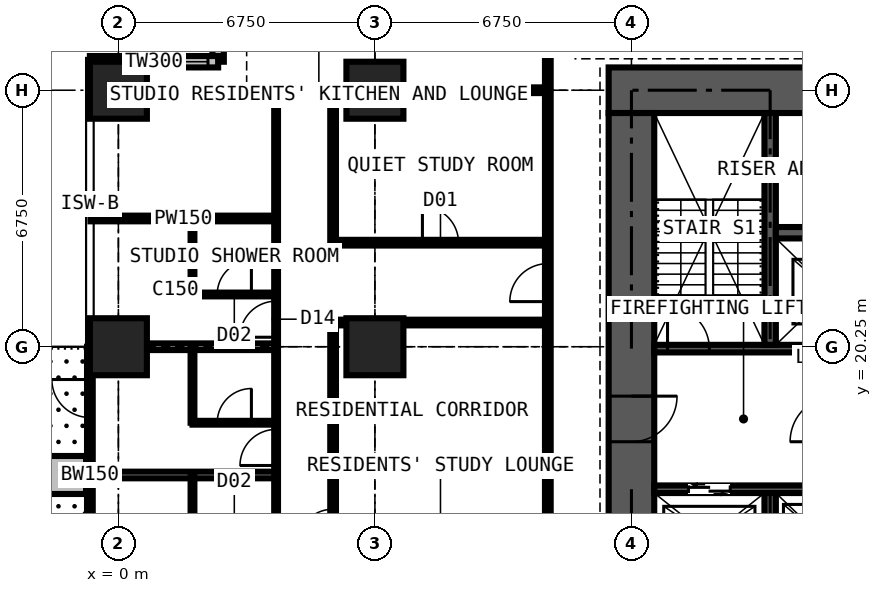
"""IFC4 building model, lengths in metres.
Left out: names, types, materials, properties, quantities, classifications, styles, units other than length and angle.
Written with IfcOpenShell. Run it as: python <this file> out.ifc"""

import sys

from ifc_helpers import new_model, si_unit, direction, frame, frame_2d, origin, origin_2d, place, context, subcontext, project, spatial, rectangle, extrude, element, fill, save


model = new_model("IFC4")
c1 = context("Model", 3, precision=1e-05, world=origin(), true_north=direction((0.0, 1.0)))
c2 = subcontext(c1, "Body", "Model", "MODEL_VIEW")
j1 = project(units=[si_unit("LENGTHUNIT", "METRE"), si_unit("PLANEANGLEUNIT", "RADIAN")], contexts=[c1])
p1 = place(None, origin())
s1 = spatial("IfcSite", under=j1, at=p1, CompositionType="ELEMENT")
p2 = place(p1, origin())
s2 = spatial("IfcBuilding", under=s1, at=p2, CompositionType="ELEMENT")
p3 = place(p2, frame((0.0, 0.0, 130.5)))
s3 = spatial("IfcBuildingStorey", under=s2, at=p3, CompositionType="ELEMENT", Elevation=130.5)
for number, where, z_axis, x_axis in (
    (1, (0.0, 20.25, 0.0), (0.0, 0.0, 1.0), (1.0, 0.0, 0.0)),
    (2, (0.0, 27.0, 0.0), (0.0, 0.0, 1.0), (1.0, 0.0, 0.0)),
    (3, (6.75, 20.25, 0.0), (0.0, 0.0, 1.0), (1.0, 0.0, 0.0)),
    (4, (6.75, 27.0, 0.0), (0.0, 0.0, 1.0), (1.0, 0.0, 0.0)),
):
    element("IfcColumn", number, at=place(p3, frame(where, z_axis=z_axis, x_axis=x_axis)), inside=s3, PredefinedType="COLUMN", context=c2, shape_type="SweptSolid", body=[
        extrude(rectangle(XDim=1.5, YDim=1.5, at=origin_2d()), origin(), (0.0, 0.0, 1.0), 3.6),
    ])
p4 = place(p3, frame((27.6, 27.0, 0.0), z_axis=(0.0, 0.0, 1.0), x_axis=(-1.0, 0.0, 0.0)))
e5 = element("IfcWall", 5, at=p4, inside=s3, PredefinedType="SHEAR", context=c2, shape_type="SweptSolid", body=[
    extrude(rectangle(XDim=14.7, YDim=1.2, at=frame_2d((7.35, 0.0))), origin(), (0.0, 0.0, 1.0), 3.6),
])
p5 = place(p4, frame((4.55, 0.0, 0.0)))
e6 = element("IfcOpeningElement", 6, at=p5, cuts=e5, PredefinedType="OPENING", context=c2, shape_type="SweptSolid", body=[
    extrude(rectangle(XDim=0.9, YDim=2.2, at=frame_2d((0.45, 1.1))), frame((0.0, 0.61, 0.0), z_axis=(0.0, -1.0, 0.0), x_axis=(1.0, 0.0, 0.0)), (0.0, 0.0, 1.0), 1.22),
])
p6 = place(p4, frame((7.525, 0.0, 0.0)))
e7 = element("IfcOpeningElement", 7, at=p6, cuts=e5, PredefinedType="OPENING", context=c2, shape_type="SweptSolid", body=[
    extrude(rectangle(XDim=1.0, YDim=2.2, at=frame_2d((0.5, 1.1))), frame((0.0, 0.61, 0.0), z_axis=(0.0, -1.0, 0.0), x_axis=(1.0, 0.0, 0.0)), (0.0, 0.0, 1.0), 1.22),
])
p7 = place(p3, frame((13.5, 26.4, 0.0), z_axis=(0.0, 0.0, 1.0), x_axis=(0.0, -1.0, 0.0)))
e8 = element("IfcWall", 8, at=p7, inside=s3, PredefinedType="SHEAR", context=c2, shape_type="SweptSolid", body=[
    extrude(rectangle(XDim=12.3, YDim=1.2, at=frame_2d((6.15, 0.0))), origin(), (0.0, 0.0, 1.0), 3.6),
])
p8 = place(p7, frame((7.45, 0.0, 0.0)))
e9 = element("IfcOpeningElement", 9, at=p8, cuts=e8, PredefinedType="OPENING", context=c2, shape_type="SweptSolid", body=[
    extrude(rectangle(XDim=1.2, YDim=2.2, at=frame_2d((0.6, 1.1))), frame((0.0, 0.61, 0.0), z_axis=(0.0, -1.0, 0.0), x_axis=(1.0, 0.0, 0.0)), (0.0, 0.0, 1.0), 1.22),
])
p9 = place(p3, frame((2.625, 31.125, 0.0), z_axis=(0.0, 0.0, 1.0), x_axis=(0.0, -1.0, 0.0)))
e10 = element("IfcWall", 10, at=p9, inside=s3, PredefinedType="SOLIDWALL", context=c2, shape_type="SweptSolid", body=[
    extrude(rectangle(XDim=3.375, YDim=0.3, at=frame_2d((1.688, 0.0))), origin(), (0.0, 0.0, 1.0), 3.375),
])
p10 = place(p9, frame((0.788, 0.0, 0.6)))
e11 = element("IfcOpeningElement", 11, at=p10, cuts=e10, PredefinedType="OPENING", context=c2, shape_type="SweptSolid", body=[
    extrude(rectangle(XDim=1.8, YDim=2.1, at=frame_2d((0.9, 1.05))), frame((0.0, 0.16, 0.0), z_axis=(0.0, -1.0, 0.0), x_axis=(1.0, 0.0, 0.0)), (0.0, 0.0, 1.0), 0.32),
])
p11 = place(p3, frame((2.625, 27.75, 0.0), z_axis=(0.0, 0.0, 1.0), x_axis=(-1.0, 0.0, 0.0)))
e12 = element("IfcWall", 12, at=p11, inside=s3, PredefinedType="SOLIDWALL", context=c2, shape_type="SweptSolid", body=[
    extrude(rectangle(XDim=3.375, YDim=0.3, at=frame_2d((1.688, 0.0))), origin(), (0.0, 0.0, 1.0), 3.375),
])
p12 = place(p11, frame((0.268, 0.0, 0.9)))
e13 = element("IfcOpeningElement", 13, at=p12, cuts=e12, PredefinedType="OPENING", context=c2, shape_type="SweptSolid", body=[
    extrude(rectangle(XDim=1.5, YDim=1.8, at=frame_2d((0.75, 0.9))), frame((0.0, 0.16, 0.0), z_axis=(0.0, -1.0, 0.0), x_axis=(1.0, 0.0, 0.0)), (0.0, 0.0, 1.0), 0.32),
])
p13 = place(p3, frame((-0.75, 13.5, 0.0), z_axis=(0.0, 0.0, 1.0), x_axis=(0.0, 1.0, 0.0)))
e14 = element("IfcWall", 14, at=p13, inside=s3, PredefinedType="SOLIDWALL", context=c2, shape_type="SweptSolid", body=[
    extrude(rectangle(XDim=6.75, YDim=0.15, at=frame_2d((3.375, 0.0))), origin(), (0.0, 0.0, 1.0), 3.375),
])
p14 = place(p13, frame((0.863, 0.0, 0.0)))
e15 = element("IfcOpeningElement", 15, at=p14, cuts=e14, PredefinedType="OPENING", context=c2, shape_type="SweptSolid", body=[
    extrude(rectangle(XDim=1.0, YDim=2.2, at=frame_2d((0.5, 1.1))), frame((0.0, 0.085, 0.0), z_axis=(0.0, -1.0, 0.0), x_axis=(1.0, 0.0, 0.0)), (0.0, 0.0, 1.0), 0.17),
])
p15 = place(p13, frame((1.975, 0.0, 0.9)))
e16 = element("IfcOpeningElement", 16, at=p15, cuts=e14, PredefinedType="OPENING", context=c2, shape_type="SweptSolid", body=[
    extrude(rectangle(XDim=1.2, YDim=1.8, at=frame_2d((0.6, 0.9))), frame((0.0, 0.085, 0.0), z_axis=(0.0, -1.0, 0.0), x_axis=(1.0, 0.0, 0.0)), (0.0, 0.0, 1.0), 0.17),
])
p16 = place(p13, frame((4.887, 0.0, 0.0)))
e17 = element("IfcOpeningElement", 17, at=p16, cuts=e14, PredefinedType="OPENING", context=c2, shape_type="SweptSolid", body=[
    extrude(rectangle(XDim=1.0, YDim=2.2, at=frame_2d((0.5, 1.1))), frame((0.0, 0.085, 0.0), z_axis=(0.0, -1.0, 0.0), x_axis=(1.0, 0.0, 0.0)), (0.0, 0.0, 1.0), 0.17),
])
p17 = place(p13, frame((3.575, 0.0, 0.9)))
e18 = element("IfcOpeningElement", 18, at=p17, cuts=e14, PredefinedType="OPENING", context=c2, shape_type="SweptSolid", body=[
    extrude(rectangle(XDim=1.2, YDim=1.8, at=frame_2d((0.6, 0.9))), frame((0.0, 0.085, 0.0), z_axis=(0.0, -1.0, 0.0), x_axis=(1.0, 0.0, 0.0)), (0.0, 0.0, 1.0), 0.17),
])
p18 = place(p3, frame((-0.85, 16.875, 0.0), z_axis=(0.0, 0.0, 1.0), x_axis=(-1.0, 0.0, 0.0)))
e19 = element("IfcWall", 19, at=p18, inside=s3, PredefinedType="USERDEFINED", context=c2, shape_type="SweptSolid", body=[
    extrude(rectangle(XDim=2.2, YDim=1.0, at=frame_2d((1.1, 0.0))), origin(), (0.0, 0.0, 1.0), 0.9),
])
p19 = place(p3, frame((14.1, 16.5, 0.0), z_axis=(0.0, 0.0, 1.0), x_axis=(1.0, 0.0, 0.0)))
e20 = element("IfcWall", 20, at=p19, inside=s3, PredefinedType="SHEAR", context=c2, shape_type="SweptSolid", body=[
    extrude(rectangle(XDim=12.3, YDim=0.2, at=frame_2d((6.15, 0.0))), origin(), (0.0, 0.0, 1.0), 3.6),
])
p20 = place(p19, frame((0.9, 0.0, 0.0)))
e21 = element("IfcOpeningElement", 21, at=p20, cuts=e20, PredefinedType="OPENING", context=c2, shape_type="SweptSolid", body=[
    extrude(rectangle(XDim=1.1, YDim=2.2, at=frame_2d((0.55, 1.1))), frame((0.0, 0.11, 0.0), z_axis=(0.0, -1.0, 0.0), x_axis=(1.0, 0.0, 0.0)), (0.0, 0.0, 1.0), 0.22),
])
p21 = place(p19, frame((9.5, 0.0, 0.0)))
e22 = element("IfcOpeningElement", 22, at=p21, cuts=e20, PredefinedType="OPENING", context=c2, shape_type="SweptSolid", body=[
    extrude(rectangle(XDim=1.1, YDim=2.2, at=frame_2d((0.55, 1.1))), frame((0.0, 0.11, 0.0), z_axis=(0.0, -1.0, 0.0), x_axis=(1.0, 0.0, 0.0)), (0.0, 0.0, 1.0), 0.22),
])
p22 = place(p3, frame((14.1, 20.2, 0.0), z_axis=(0.0, 0.0, 1.0), x_axis=(1.0, 0.0, 0.0)))
e23 = element("IfcWall", 23, at=p22, inside=s3, PredefinedType="SHEAR", context=c2, shape_type="SweptSolid", body=[
    extrude(rectangle(XDim=12.3, YDim=0.2, at=frame_2d((6.15, 0.0))), origin(), (0.0, 0.0, 1.0), 3.6),
])
p23 = place(p22, frame((0.35, 0.0, 0.0)))
e24 = element("IfcOpeningElement", 24, at=p23, cuts=e23, PredefinedType="OPENING", context=c2, shape_type="SweptSolid", body=[
    extrude(rectangle(XDim=1.1, YDim=2.2, at=frame_2d((0.55, 1.1))), frame((0.0, 0.11, 0.0), z_axis=(0.0, -1.0, 0.0), x_axis=(1.0, 0.0, 0.0)), (0.0, 0.0, 1.0), 0.22),
])
p24 = place(p22, frame((9.75, 0.0, 0.0)))
e25 = element("IfcOpeningElement", 25, at=p24, cuts=e23, PredefinedType="OPENING", context=c2, shape_type="SweptSolid", body=[
    extrude(rectangle(XDim=1.1, YDim=2.2, at=frame_2d((0.55, 1.1))), frame((0.0, 0.11, 0.0), z_axis=(0.0, -1.0, 0.0), x_axis=(1.0, 0.0, 0.0)), (0.0, 0.0, 1.0), 0.22),
])
p25 = place(p3, frame((17.15, 20.3, 0.0), z_axis=(0.0, 0.0, 1.0), x_axis=(0.0, 1.0, 0.0)))
e26 = element("IfcWall", 26, at=p25, inside=s3, PredefinedType="SHEAR", context=c2, shape_type="SweptSolid", body=[
    extrude(rectangle(XDim=6.1, YDim=0.3, at=frame_2d((3.05, 0.0))), origin(), (0.0, 0.0, 1.0), 3.6),
])
p26 = place(p3, frame((17.3, 23.25, 0.0), z_axis=(0.0, 0.0, 1.0), x_axis=(1.0, 0.0, 0.0)))
e27 = element("IfcWall", 27, at=p26, inside=s3, PredefinedType="SHEAR", context=c2, shape_type="SweptSolid", body=[
    extrude(rectangle(XDim=5.9, YDim=0.3, at=frame_2d((2.95, 0.0))), origin(), (0.0, 0.0, 1.0), 3.6),
])
p27 = place(p3, frame((17.15, 14.1, 0.0), z_axis=(0.0, 0.0, 1.0), x_axis=(0.0, 1.0, 0.0)))
e28 = element("IfcWall", 28, at=p27, inside=s3, PredefinedType="SHEAR", context=c2, shape_type="SweptSolid", body=[
    extrude(rectangle(XDim=2.3, YDim=0.3, at=frame_2d((1.15, 0.0))), origin(), (0.0, 0.0, 1.0), 3.6),
])
p28 = place(p3, frame((-0.734, 16.875, 0.0), z_axis=(0.0, 0.0, 1.0), x_axis=(1.0, 0.0, 0.0)))
e29 = element("IfcWall", 29, at=p28, inside=s3, PredefinedType="PARTITIONING", context=c2, shape_type="SweptSolid", body=[
    extrude(rectangle(XDim=4.884, YDim=0.175, at=frame_2d((2.442, 0.0))), origin(), (0.0, 0.0, 1.0), 3.375),
])
p29 = place(p3, frame((-0.734, 20.25, 0.0), z_axis=(0.0, 0.0, 1.0), x_axis=(1.0, 0.0, 0.0)))
e30 = element("IfcWall", 30, at=p29, inside=s3, PredefinedType="PARTITIONING", context=c2, shape_type="SweptSolid", body=[
    extrude(rectangle(XDim=4.884, YDim=0.175, at=frame_2d((2.442, 0.0))), origin(), (0.0, 0.0, 1.0), 2.877),
])
p30 = place(p3, frame((-0.734, 23.625, 0.0), z_axis=(0.0, 0.0, 1.0), x_axis=(1.0, 0.0, 0.0)))
e31 = element("IfcWall", 31, at=p30, inside=s3, PredefinedType="PARTITIONING", context=c2, shape_type="SweptSolid", body=[
    extrude(rectangle(XDim=4.884, YDim=0.15, at=frame_2d((2.442, 0.0))), origin(), (0.0, 0.0, 1.0), 3.375),
])
for number, where, z_axis, x_axis in (
    (32, (1.95, 14.875, 0.0), (0.0, 0.0, 1.0), (0.0, 1.0, 0.0)),
    (33, (1.95, 18.25, 0.0), (0.0, 0.0, 1.0), (0.0, 1.0, 0.0)),
):
    element("IfcWall", number, at=place(p3, frame(where, z_axis=z_axis, x_axis=x_axis)), inside=s3, PredefinedType="PARTITIONING", context=c2, shape_type="SweptSolid", body=[
        extrude(rectangle(XDim=2.0, YDim=0.1, at=frame_2d((1.0, 0.0))), origin(), (0.0, 0.0, 1.0), 3.375),
    ])
p31 = place(p3, frame((1.95, 18.25, 0.0), z_axis=(0.0, 0.0, 1.0), x_axis=(1.0, 0.0, 0.0)))
e34 = element("IfcWall", 34, at=p31, inside=s3, PredefinedType="PARTITIONING", context=c2, shape_type="SweptSolid", body=[
    extrude(rectangle(XDim=2.2, YDim=0.1, at=frame_2d((1.1, 0.0))), origin(), (0.0, 0.0, 1.0), 3.375),
])
p32 = place(p31, frame((0.65, 0.0, 0.0)))
e35 = element("IfcOpeningElement", 35, at=p32, cuts=e34, PredefinedType="OPENING", context=c2, shape_type="SweptSolid", body=[
    extrude(rectangle(XDim=0.9, YDim=2.2, at=frame_2d((0.45, 1.1))), frame((0.0, 0.06, 0.0), z_axis=(0.0, -1.0, 0.0), x_axis=(1.0, 0.0, 0.0)), (0.0, 0.0, 1.0), 0.12),
])
p33 = place(p3, frame((1.95, 21.625, 0.0), z_axis=(0.0, 0.0, 1.0), x_axis=(0.0, 1.0, 0.0)))
e36 = element("IfcWall", 36, at=p33, inside=s3, PredefinedType="PARTITIONING", context=c2, shape_type="SweptSolid", body=[
    extrude(rectangle(XDim=2.0, YDim=0.1, at=frame_2d((1.0, 0.0))), origin(), (0.0, 0.0, 1.0), 3.375),
])
p34 = place(p3, frame((1.95, 21.625, 0.0), z_axis=(0.0, 0.0, 1.0), x_axis=(1.0, 0.0, 0.0)))
e37 = element("IfcWall", 37, at=p34, inside=s3, PredefinedType="PARTITIONING", context=c2, shape_type="SweptSolid", body=[
    extrude(rectangle(XDim=2.2, YDim=0.1, at=frame_2d((1.1, 0.0))), origin(), (0.0, 0.0, 1.0), 3.375),
])
p35 = place(p34, frame((0.65, 0.0, 0.0)))
e38 = element("IfcOpeningElement", 38, at=p35, cuts=e37, PredefinedType="OPENING", context=c2, shape_type="SweptSolid", body=[
    extrude(rectangle(XDim=0.9, YDim=2.2, at=frame_2d((0.45, 1.1))), frame((0.0, 0.06, 0.0), z_axis=(0.0, -1.0, 0.0), x_axis=(1.0, 0.0, 0.0)), (0.0, 0.0, 1.0), 0.12),
])
p36 = place(p3, frame((4.15, 10.125, 0.0), z_axis=(0.0, 0.0, 1.0), x_axis=(0.0, 1.0, 0.0)))
e39 = element("IfcWall", 39, at=p36, inside=s3, PredefinedType="PARTITIONING", context=c2, shape_type="SweptSolid", body=[
    extrude(rectangle(XDim=16.875, YDim=0.1, at=frame_2d((8.438, 0.0))), origin(), (0.0, 0.0, 1.0), 3.375),
])
p37 = place(p36, frame((0.2, 0.0, 0.0)))
e40 = element("IfcOpeningElement", 40, at=p37, cuts=e39, PredefinedType="OPENING", context=c2, shape_type="SweptSolid", body=[
    extrude(rectangle(XDim=0.95, YDim=2.2, at=frame_2d((0.475, 1.1))), frame((0.0, 0.06, 0.0), z_axis=(0.0, -1.0, 0.0), x_axis=(1.0, 0.0, 0.0)), (0.0, 0.0, 1.0), 0.12),
])
p38 = place(p36, frame((3.625, 0.0, 0.0)))
e41 = element("IfcOpeningElement", 41, at=p38, cuts=e39, PredefinedType="OPENING", context=c2, shape_type="SweptSolid", body=[
    extrude(rectangle(XDim=0.95, YDim=2.2, at=frame_2d((0.475, 1.1))), frame((0.0, 0.06, 0.0), z_axis=(0.0, -1.0, 0.0), x_axis=(1.0, 0.0, 0.0)), (0.0, 0.0, 1.0), 0.12),
])
p39 = place(p36, frame((7.0, 0.0, 0.0)))
e42 = element("IfcOpeningElement", 42, at=p39, cuts=e39, PredefinedType="OPENING", context=c2, shape_type="SweptSolid", body=[
    extrude(rectangle(XDim=0.95, YDim=2.2, at=frame_2d((0.475, 1.1))), frame((0.0, 0.06, 0.0), z_axis=(0.0, -1.0, 0.0), x_axis=(1.0, 0.0, 0.0)), (0.0, 0.0, 1.0), 0.12),
])
p40 = place(p36, frame((10.375, 0.0, 0.0)))
e43 = element("IfcOpeningElement", 43, at=p40, cuts=e39, PredefinedType="OPENING", context=c2, shape_type="SweptSolid", body=[
    extrude(rectangle(XDim=0.95, YDim=2.2, at=frame_2d((0.475, 1.1))), frame((0.0, 0.06, 0.0), z_axis=(0.0, -1.0, 0.0), x_axis=(1.0, 0.0, 0.0)), (0.0, 0.0, 1.0), 0.12),
])
p41 = place(p3, frame((4.15, 27.0, 0.0), z_axis=(0.0, 0.0, 1.0), x_axis=(1.0, 0.0, 0.0)))
e44 = element("IfcWall", 44, at=p41, inside=s3, PredefinedType="PARTITIONING", context=c2, shape_type="SweptSolid", body=[
    extrude(rectangle(XDim=7.15, YDim=0.15, at=frame_2d((3.575, 0.0))), origin(), (0.0, 0.0, 1.0), 2.806),
])
p42 = place(p3, frame((5.65, 10.125, 0.0), z_axis=(0.0, 0.0, 1.0), x_axis=(0.0, 1.0, 0.0)))
e45 = element("IfcWall", 45, at=p42, inside=s3, PredefinedType="PARTITIONING", context=c2, shape_type="SweptSolid", body=[
    extrude(rectangle(XDim=10.762, YDim=0.15, at=frame_2d((5.381, 0.0))), origin(), (0.0, 0.0, 1.0), 3.375),
])
p43 = place(p42, frame((4.9, 0.0, 0.0)))
e46 = element("IfcOpeningElement", 46, at=p43, cuts=e45, PredefinedType="OPENING", context=c2, shape_type="SweptSolid", body=[
    extrude(rectangle(XDim=0.95, YDim=2.2, at=frame_2d((0.475, 1.1))), frame((0.0, 0.085, 0.0), z_axis=(0.0, -1.0, 0.0), x_axis=(1.0, 0.0, 0.0)), (0.0, 0.0, 1.0), 0.17),
])
p44 = place(p3, frame((5.65, 20.887, 0.0), z_axis=(0.0, 0.0, 1.0), x_axis=(1.0, 0.0, 0.0)))
e47 = element("IfcWall", 47, at=p44, inside=s3, PredefinedType="PARTITIONING", context=c2, shape_type="SweptSolid", body=[
    extrude(rectangle(XDim=5.65, YDim=0.15, at=frame_2d((2.825, 0.0))), origin(), (0.0, 0.0, 1.0), 3.375),
])
p45 = place(p3, frame((5.65, 22.988, 0.0), z_axis=(0.0, 0.0, 1.0), x_axis=(0.0, 1.0, 0.0)))
e48 = element("IfcWall", 48, at=p45, inside=s3, PredefinedType="PARTITIONING", context=c2, shape_type="SweptSolid", body=[
    extrude(rectangle(XDim=4.012, YDim=0.15, at=frame_2d((2.006, 0.0))), origin(), (0.0, 0.0, 1.0), 3.375),
])
p46 = place(p3, frame((5.65, 22.988, 0.0), z_axis=(0.0, 0.0, 1.0), x_axis=(1.0, 0.0, 0.0)))
e49 = element("IfcWall", 49, at=p46, inside=s3, PredefinedType="PARTITIONING", context=c2, shape_type="SweptSolid", body=[
    extrude(rectangle(XDim=5.65, YDim=0.15, at=frame_2d((2.825, 0.0))), origin(), (0.0, 0.0, 1.0), 3.375),
])
p47 = place(p46, frame((2.35, 0.0, 0.0)))
e50 = element("IfcOpeningElement", 50, at=p47, cuts=e49, PredefinedType="OPENING", context=c2, shape_type="SweptSolid", body=[
    extrude(rectangle(XDim=0.95, YDim=2.2, at=frame_2d((0.475, 1.1))), frame((0.0, 0.085, 0.0), z_axis=(0.0, -1.0, 0.0), x_axis=(1.0, 0.0, 0.0)), (0.0, 0.0, 1.0), 0.17),
])
p48 = place(p3, frame((11.3, 11.3, 0.0), z_axis=(0.0, 0.0, 1.0), x_axis=(0.0, 1.0, 0.0)))
e51 = element("IfcWall", 51, at=p48, inside=s3, PredefinedType="PARTITIONING", context=c2, shape_type="SweptSolid", body=[
    extrude(rectangle(XDim=19.3, YDim=0.15, at=frame_2d((9.65, 0.0))), origin(), (0.0, 0.0, 1.0), 3.375),
])
p49 = place(p48, frame((18.1, 0.0, 0.0)))
e52 = element("IfcOpeningElement", 52, at=p49, cuts=e51, PredefinedType="OPENING", context=c2, shape_type="SweptSolid", body=[
    extrude(rectangle(XDim=1.0, YDim=2.2, at=frame_2d((0.5, 1.1))), frame((0.0, 0.085, 0.0), z_axis=(0.0, -1.0, 0.0), x_axis=(1.0, 0.0, 0.0)), (0.0, 0.0, 1.0), 0.17),
])
p50 = place(p48, frame((10.137, 0.0, 0.0)))
e53 = element("IfcOpeningElement", 53, at=p50, cuts=e51, PredefinedType="OPENING", context=c2, shape_type="SweptSolid", body=[
    extrude(rectangle(XDim=1.0, YDim=2.2, at=frame_2d((0.5, 1.1))), frame((0.0, 0.085, 0.0), z_axis=(0.0, -1.0, 0.0), x_axis=(1.0, 0.0, 0.0)), (0.0, 0.0, 1.0), 0.17),
])
p51 = place(p12, origin())
e54 = element("IfcWindow", 54, at=p51, inside=s3, PartitioningType="SINGLE_PANEL", PredefinedType="WINDOW", context=c2, shape_type="SweptSolid", body=[
    extrude(rectangle(XDim=1.5, YDim=1.8, at=frame_2d((0.75, 0.9))), frame((0.0, 0.03, 0.0), z_axis=(0.0, -1.0, 0.0), x_axis=(1.0, 0.0, 0.0)), (0.0, 0.0, 1.0), 0.06),
])
fill(e13, e54)
p52 = place(p15, origin())
e55 = element("IfcWindow", 55, at=p52, inside=s3, PartitioningType="SINGLE_PANEL", PredefinedType="WINDOW", context=c2, shape_type="SweptSolid", body=[
    extrude(rectangle(XDim=1.2, YDim=1.8, at=frame_2d((0.6, 0.9))), frame((0.0, 0.03, 0.0), z_axis=(0.0, -1.0, 0.0), x_axis=(1.0, 0.0, 0.0)), (0.0, 0.0, 1.0), 0.06),
])
fill(e16, e55)
p53 = place(p16, origin())
e56 = element("IfcDoor", 56, at=p53, inside=s3, OperationType="SINGLE_SWING_RIGHT", PredefinedType="DOOR", context=c2, shape_type="SweptSolid", body=[
    extrude(rectangle(XDim=1.0, YDim=2.2, at=frame_2d((0.5, 1.1))), frame((0.0, 0.025, 0.0), z_axis=(0.0, -1.0, 0.0), x_axis=(1.0, 0.0, 0.0)), (0.0, 0.0, 1.0), 0.05),
])
fill(e17, e56)
p54 = place(p17, origin())
e57 = element("IfcWindow", 57, at=p54, inside=s3, PartitioningType="SINGLE_PANEL", PredefinedType="WINDOW", context=c2, shape_type="SweptSolid", body=[
    extrude(rectangle(XDim=1.2, YDim=1.8, at=frame_2d((0.6, 0.9))), frame((0.0, 0.03, 0.0), z_axis=(0.0, -1.0, 0.0), x_axis=(1.0, 0.0, 0.0)), (0.0, 0.0, 1.0), 0.06),
])
fill(e18, e57)
p55 = place(p20, origin())
e58 = element("IfcDoor", 58, at=p55, inside=s3, OperationType="DOUBLE_DOOR_SLIDING", PredefinedType="DOOR", context=c2, shape_type="SweptSolid", body=[
    extrude(rectangle(XDim=1.1, YDim=2.2, at=frame_2d((0.55, 1.1))), frame((0.0, 0.025, 0.0), z_axis=(0.0, -1.0, 0.0), x_axis=(1.0, 0.0, 0.0)), (0.0, 0.0, 1.0), 0.05),
])
fill(e21, e58)
p56 = place(p8, origin())
e59 = element("IfcDoor", 59, at=p56, inside=s3, OperationType="DOUBLE_DOOR_SINGLE_SWING", PredefinedType="DOOR", context=c2, shape_type="SweptSolid", body=[
    extrude(rectangle(XDim=1.2, YDim=2.2, at=frame_2d((0.6, 1.1))), frame((0.0, 0.025, 0.0), z_axis=(0.0, -1.0, 0.0), x_axis=(1.0, 0.0, 0.0)), (0.0, 0.0, 1.0), 0.05),
])
fill(e9, e59)
p57 = place(p23, origin())
e60 = element("IfcDoor", 60, at=p57, inside=s3, OperationType="SINGLE_SWING_LEFT", PredefinedType="DOOR", context=c2, shape_type="SweptSolid", body=[
    extrude(rectangle(XDim=1.1, YDim=2.2, at=frame_2d((0.55, 1.1))), frame((0.0, 0.025, 0.0), z_axis=(0.0, -1.0, 0.0), x_axis=(1.0, 0.0, 0.0)), (0.0, 0.0, 1.0), 0.05),
])
fill(e24, e60)
p58 = place(p39, origin())
e61 = element("IfcDoor", 61, at=p58, inside=s3, OperationType="SINGLE_SWING_LEFT", PredefinedType="DOOR", context=c2, shape_type="SweptSolid", body=[
    extrude(rectangle(XDim=0.95, YDim=2.2, at=frame_2d((0.475, 1.1))), frame((0.0, 0.025, 0.0), z_axis=(0.0, -1.0, 0.0), x_axis=(1.0, 0.0, 0.0)), (0.0, 0.0, 1.0), 0.05),
])
fill(e42, e61)
p59 = place(p32, origin())
e62 = element("IfcDoor", 62, at=p59, inside=s3, OperationType="SINGLE_SWING_RIGHT", PredefinedType="DOOR", context=c2, shape_type="SweptSolid", body=[
    extrude(rectangle(XDim=0.9, YDim=2.2, at=frame_2d((0.45, 1.1))), frame((0.0, 0.025, 0.0), z_axis=(0.0, -1.0, 0.0), x_axis=(1.0, 0.0, 0.0)), (0.0, 0.0, 1.0), 0.05),
])
fill(e35, e62)
p60 = place(p40, origin())
e63 = element("IfcDoor", 63, at=p60, inside=s3, OperationType="SINGLE_SWING_LEFT", PredefinedType="DOOR", context=c2, shape_type="SweptSolid", body=[
    extrude(rectangle(XDim=0.95, YDim=2.2, at=frame_2d((0.475, 1.1))), frame((0.0, 0.025, 0.0), z_axis=(0.0, -1.0, 0.0), x_axis=(1.0, 0.0, 0.0)), (0.0, 0.0, 1.0), 0.05),
])
fill(e43, e63)
p61 = place(p35, origin())
e64 = element("IfcDoor", 64, at=p61, inside=s3, OperationType="SINGLE_SWING_RIGHT", PredefinedType="DOOR", context=c2, shape_type="SweptSolid", body=[
    extrude(rectangle(XDim=0.9, YDim=2.2, at=frame_2d((0.45, 1.1))), frame((0.0, 0.025, 0.0), z_axis=(0.0, -1.0, 0.0), x_axis=(1.0, 0.0, 0.0)), (0.0, 0.0, 1.0), 0.05),
])
fill(e38, e64)
p62 = place(p50, origin())
e65 = element("IfcDoor", 65, at=p62, inside=s3, OperationType="SINGLE_SWING_LEFT", PredefinedType="DOOR", context=c2, shape_type="SweptSolid", body=[
    extrude(rectangle(XDim=1.0, YDim=2.2, at=frame_2d((0.5, 1.1))), frame((0.0, 0.025, 0.0), z_axis=(0.0, -1.0, 0.0), x_axis=(1.0, 0.0, 0.0)), (0.0, 0.0, 1.0), 0.05),
])
fill(e53, e65)
p63 = place(p43, origin())
e66 = element("IfcDoor", 66, at=p63, inside=s3, OperationType="SINGLE_SWING_LEFT", PredefinedType="DOOR", context=c2, shape_type="SweptSolid", body=[
    extrude(rectangle(XDim=0.95, YDim=2.2, at=frame_2d((0.475, 1.1))), frame((0.0, 0.025, 0.0), z_axis=(0.0, -1.0, 0.0), x_axis=(1.0, 0.0, 0.0)), (0.0, 0.0, 1.0), 0.05),
])
fill(e46, e66)
p64 = place(p47, origin())
e67 = element("IfcDoor", 67, at=p64, inside=s3, OperationType="SINGLE_SWING_LEFT", PredefinedType="DOOR", context=c2, shape_type="SweptSolid", body=[
    extrude(rectangle(XDim=0.95, YDim=2.2, at=frame_2d((0.475, 1.1))), frame((0.0, 0.025, 0.0), z_axis=(0.0, -1.0, 0.0), x_axis=(1.0, 0.0, 0.0)), (0.0, 0.0, 1.0), 0.05),
])
fill(e50, e67)
save(model, sys.argv[1])
